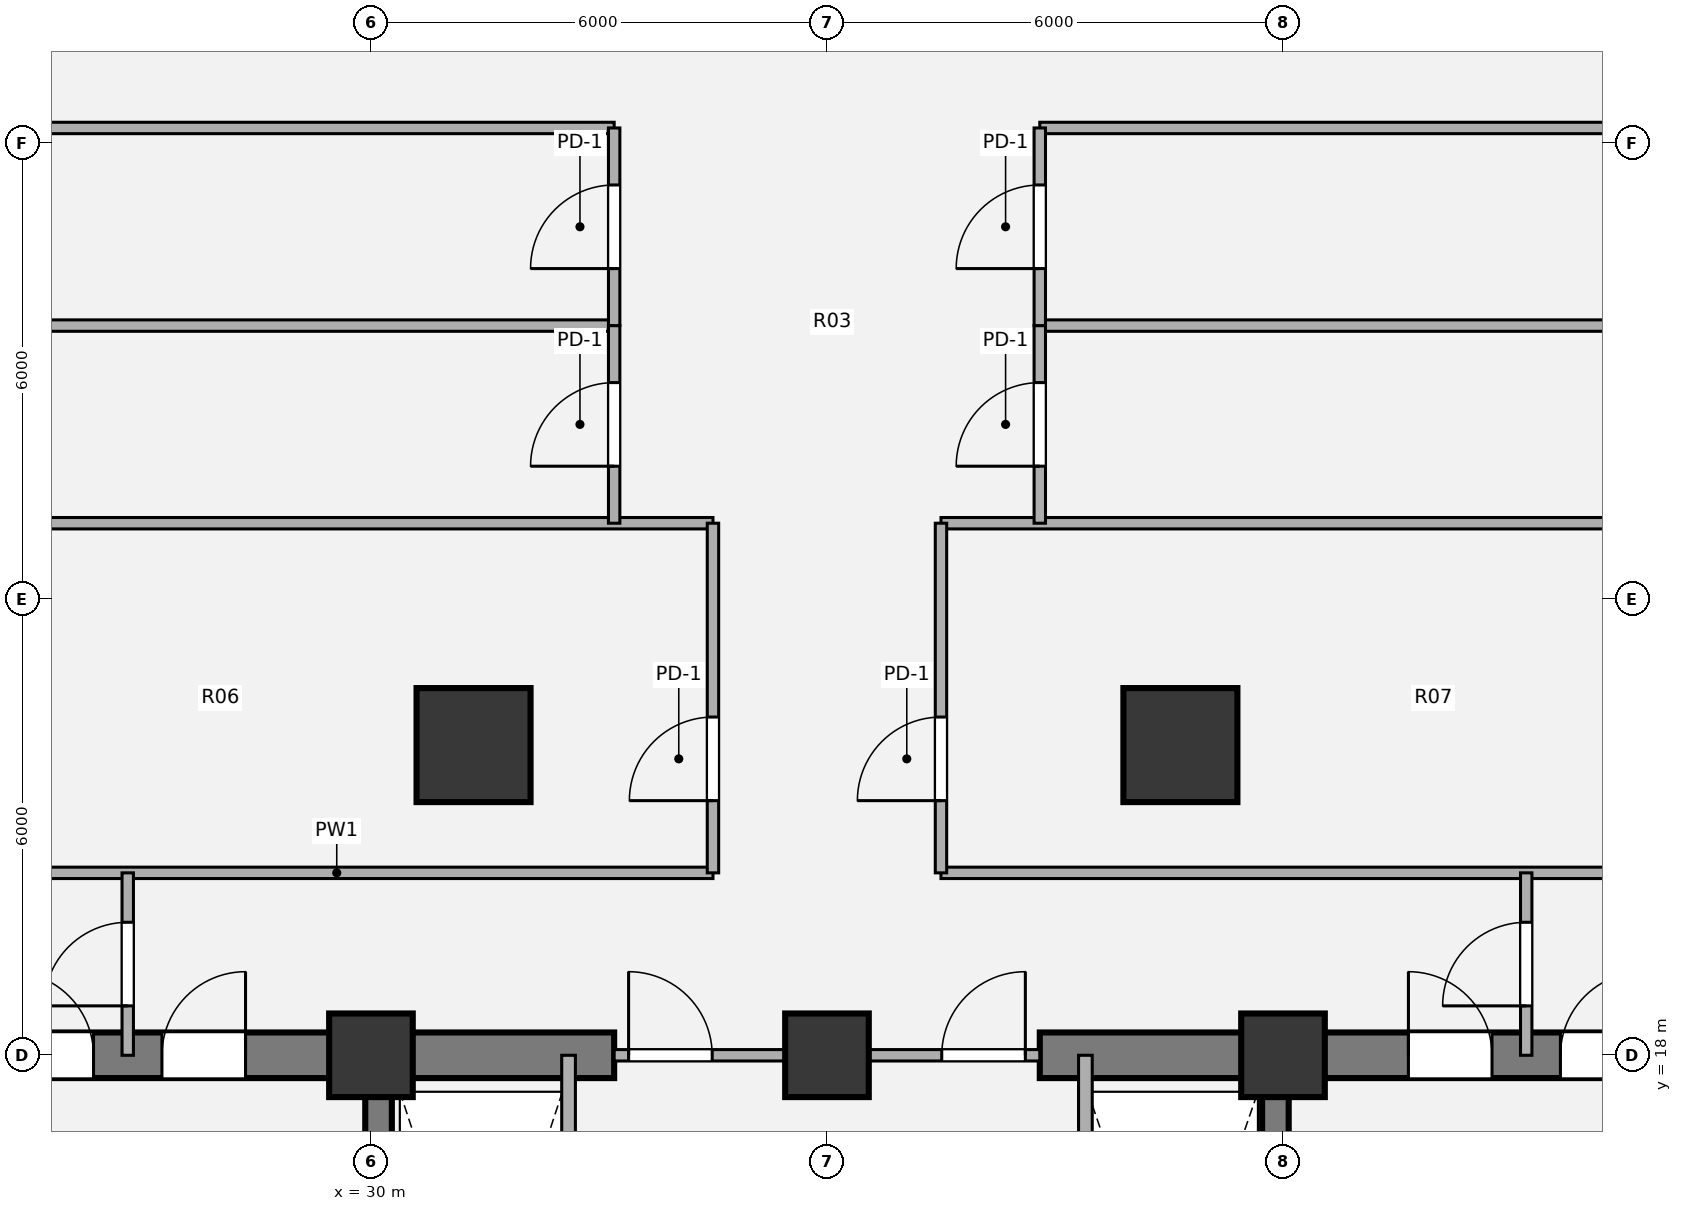
"""IFC4 building model, lengths in metres.
Left out: names, types, materials, properties, quantities, classifications, styles, units other than length and angle.
Written with IfcOpenShell. Run it as: python <this file> out.ifc"""

import sys

from ifc_helpers import new_model, si_unit, direction, frame, frame_2d, origin, origin_2d, place, context, subcontext, project, spatial, rectangle, hollow_circle, extrude, source, transform, mapped, element, fill, save


model = new_model("IFC4")
c1 = context("Model", 3, precision=1e-05, world=origin(), true_north=direction((0.0, 1.0)))
c2 = subcontext(c1, "Body", "Model", "MODEL_VIEW")
j1 = project(units=[si_unit("LENGTHUNIT", "METRE"), si_unit("PLANEANGLEUNIT", "RADIAN")], contexts=[c1])
p1 = place(None, origin())
s1 = spatial("IfcSite", under=j1, at=p1, CompositionType="ELEMENT")
p2 = place(p1, origin())
s2 = spatial("IfcBuilding", under=s1, at=p2, CompositionType="ELEMENT")
p3 = place(p2, frame((0.0, 0.0, 79.92)))
s3 = spatial("IfcBuildingStorey", under=s2, at=p3, CompositionType="ELEMENT", Elevation=79.92)
m1 = source(origin(), c2, "Body", "SweptSolid", [
    extrude(rectangle(XDim=1.1, YDim=1.1, at=origin_2d()), origin(), (0.0, 0.0, 1.0), 5.4),
])
for number, where, z_axis, x_axis in (
    (1, (30.0, 18.0, 0.0), (0.0, 0.0, 1.0), (1.0, 0.0, 0.0)),
    (2, (36.0, 18.0, 0.0), (0.0, 0.0, 1.0), (1.0, 0.0, 0.0)),
    (3, (42.0, 18.0, 0.0), (0.0, 0.0, 1.0), (1.0, 0.0, 0.0)),
):
    element("IfcColumn", number, at=place(p3, frame(where, z_axis=z_axis, x_axis=x_axis)), inside=s3, PredefinedType="COLUMN", context=c2, shape_type="MappedRepresentation", body=[
        mapped(m1, transform((0.0, 0.0, 0.0), x_axis=(1.0, 0.0, 0.0), y_axis=(0.0, 1.0, 0.0), z_axis=(0.0, 0.0, 1.0), scale=1.0)),
    ])
p4 = place(p3, frame((23.7, 18.0, 0.0), z_axis=(0.0, 0.0, 1.0), x_axis=(1.0, 0.0, 0.0)))
e4 = element("IfcWall", 4, at=p4, inside=s3, PredefinedType="SHEAR", context=c2, shape_type="SweptSolid", body=[
    extrude(rectangle(XDim=9.5, YDim=0.6, at=frame_2d((4.75, 0.0))), origin(), (0.0, 0.0, 1.0), 5.4),
])
p5 = place(p4, frame((1.55, 0.0, 0.0)))
e5 = element("IfcOpeningElement", 5, at=p5, cuts=e4, PredefinedType="OPENING", context=c2, shape_type="SweptSolid", body=[
    extrude(rectangle(XDim=1.1, YDim=2.1, at=origin_2d()), frame((0.55, 0.31, 1.05), z_axis=(0.0, -1.0, 0.0), x_axis=(1.0, 0.0, 0.0)), (0.0, 0.0, 1.0), 0.62),
])
p6 = place(p4, frame((3.55, 0.0, 0.0)))
e6 = element("IfcOpeningElement", 6, at=p6, cuts=e4, PredefinedType="OPENING", context=c2, shape_type="SweptSolid", body=[
    extrude(rectangle(XDim=1.1, YDim=2.1, at=origin_2d()), frame((0.55, 0.31, 1.05), z_axis=(0.0, -1.0, 0.0), x_axis=(1.0, 0.0, 0.0)), (0.0, 0.0, 1.0), 0.62),
])
p7 = place(p3, frame((38.8, 18.0, 0.0), z_axis=(0.0, 0.0, 1.0), x_axis=(1.0, 0.0, 0.0)))
e7 = element("IfcWall", 7, at=p7, inside=s3, PredefinedType="SHEAR", context=c2, shape_type="SweptSolid", body=[
    extrude(rectangle(XDim=9.5, YDim=0.6, at=frame_2d((4.75, 0.0))), origin(), (0.0, 0.0, 1.0), 5.4),
])
p8 = place(p7, frame((4.85, 0.0, 0.0)))
e8 = element("IfcOpeningElement", 8, at=p8, cuts=e7, PredefinedType="OPENING", context=c2, shape_type="SweptSolid", body=[
    extrude(rectangle(XDim=1.1, YDim=2.1, at=origin_2d()), frame((0.55, 0.31, 1.05), z_axis=(0.0, -1.0, 0.0), x_axis=(1.0, 0.0, 0.0)), (0.0, 0.0, 1.0), 0.62),
])
p9 = place(p7, frame((6.85, 0.0, 0.0)))
e9 = element("IfcOpeningElement", 9, at=p9, cuts=e7, PredefinedType="OPENING", context=c2, shape_type="SweptSolid", body=[
    extrude(rectangle(XDim=1.1, YDim=2.1, at=origin_2d()), frame((0.55, 0.31, 1.05), z_axis=(0.0, -1.0, 0.0), x_axis=(1.0, 0.0, 0.0)), (0.0, 0.0, 1.0), 0.62),
])
p10 = place(p3, frame((30.1, 6.0, 0.0), z_axis=(0.0, 0.0, 1.0), x_axis=(0.0, 1.0, 0.0)))
e10 = element("IfcWall", 10, at=p10, inside=s3, PredefinedType="SHEAR", context=c2, shape_type="SweptSolid", body=[
    extrude(rectangle(XDim=12.0, YDim=0.35, at=frame_2d((6.0, 0.0))), origin(), (0.0, 0.0, 1.0), 5.4),
])
p11 = place(p3, frame((41.9, 18.0, 0.0), z_axis=(0.0, 0.0, 1.0), x_axis=(0.0, -1.0, 0.0)))
e11 = element("IfcWall", 11, at=p11, inside=s3, PredefinedType="SHEAR", context=c2, shape_type="SweptSolid", body=[
    extrude(rectangle(XDim=12.0, YDim=0.35, at=frame_2d((6.0, 0.0))), origin(), (0.0, 0.0, 1.0), 5.4),
])
p12 = place(p11, frame((10.08, 0.0, 0.0)))
e12 = element("IfcOpeningElement", 12, at=p12, cuts=e11, PredefinedType="OPENING", context=c2, shape_type="SweptSolid", body=[
    extrude(rectangle(XDim=1.3, YDim=2.1, at=origin_2d()), frame((0.65, 0.185, 1.05), z_axis=(0.0, -1.0, 0.0), x_axis=(1.0, 0.0, 0.0)), (0.0, 0.0, 1.0), 0.37),
])
m2 = source(origin(), c2, "Body", "SweptSolid", [
    extrude(hollow_circle(Radius=0.75, WallThickness=0.05, at=origin_2d()), origin(), (0.0, 0.0, 1.0), 6.108),
])
for number, where, z_axis, x_axis in (
    (13, (31.35, 20.285, 0.46), (0.0, 0.588, 0.809), (-1.0, 0.0, 0.0)),
    (14, (40.65, 20.285, 0.46), (0.0, 0.588, 0.809), (-1.0, 0.0, 0.0)),
):
    element("IfcColumn", number, at=place(p3, frame(where, z_axis=z_axis, x_axis=x_axis)), inside=s3, PredefinedType="COLUMN", context=c2, shape_type="MappedRepresentation", body=[
        mapped(m2, transform((0.0, 0.0, 0.0), x_axis=(1.0, 0.0, 0.0), y_axis=(0.0, 1.0, 0.0), z_axis=(0.0, 0.0, 1.0), scale=1.0)),
    ])
p13 = place(p3, frame((39.4, 11.0, 0.0), z_axis=(0.0, 0.0, 1.0), x_axis=(0.0, 1.0, 0.0)))
e15 = element("IfcWall", 15, at=p13, inside=s3, PredefinedType="PARTITIONING", context=c2, shape_type="SweptSolid", body=[
    extrude(rectangle(XDim=7.0, YDim=0.18, at=frame_2d((3.5, 0.0))), origin(), (0.0, 0.0, 1.0), 5.05),
])
p14 = place(p3, frame((33.2, 18.0, 0.0), z_axis=(0.0, 0.0, 1.0), x_axis=(1.0, 0.0, 0.0)))
e16 = element("IfcWall", 16, at=p14, inside=s3, PredefinedType="PARTITIONING", context=c2, shape_type="SweptSolid", body=[
    extrude(rectangle(XDim=5.6, YDim=0.15, at=frame_2d((2.8, 0.0))), origin(), (0.0, 0.0, 1.0), 3.865),
])
p15 = place(p14, frame((0.19, 0.0, 0.0)))
e17 = element("IfcOpeningElement", 17, at=p15, cuts=e16, PredefinedType="OPENING", context=c2, shape_type="SweptSolid", body=[
    extrude(rectangle(XDim=1.1, YDim=2.1, at=origin_2d()), frame((0.55, 0.085, 1.05), z_axis=(0.0, -1.0, 0.0), x_axis=(1.0, 0.0, 0.0)), (0.0, 0.0, 1.0), 0.17),
])
p16 = place(p14, frame((4.31, 0.0, 0.0)))
e18 = element("IfcOpeningElement", 18, at=p16, cuts=e16, PredefinedType="OPENING", context=c2, shape_type="SweptSolid", body=[
    extrude(rectangle(XDim=1.1, YDim=2.1, at=origin_2d()), frame((0.55, 0.085, 1.05), z_axis=(0.0, -1.0, 0.0), x_axis=(1.0, 0.0, 0.0)), (0.0, 0.0, 1.0), 0.17),
])
p17 = place(p3, frame((32.6, 11.0, 0.0), z_axis=(0.0, 0.0, 1.0), x_axis=(0.0, 1.0, 0.0)))
e19 = element("IfcWall", 19, at=p17, inside=s3, PredefinedType="PARTITIONING", context=c2, shape_type="SweptSolid", body=[
    extrude(rectangle(XDim=7.0, YDim=0.18, at=frame_2d((3.5, 0.0))), origin(), (0.0, 0.0, 1.0), 5.05),
])
for number, where, z_axis, x_axis in (
    (20, (24.6, 20.4, 0.0), (0.0, 0.0, 1.0), (1.0, 0.0, 0.0)),
    (21, (37.5, 20.4, 0.0), (0.0, 0.0, 1.0), (1.0, 0.0, 0.0)),
):
    element("IfcWall", number, at=place(p3, frame(where, z_axis=z_axis, x_axis=x_axis)), inside=s3, PredefinedType="PARTITIONING", context=c2, shape_type="SweptSolid", body=[
        extrude(rectangle(XDim=9.9, YDim=0.15, at=frame_2d((4.95, 0.0))), origin(), (0.0, 0.0, 1.0), 5.05),
    ])
for number, where, z_axis, x_axis in (
    (22, (14.6, 25.0, 0.0), (0.0, 0.0, 1.0), (1.0, 0.0, 0.0)),
    (23, (37.5, 25.0, 0.0), (0.0, 0.0, 1.0), (1.0, 0.0, 0.0)),
):
    element("IfcWall", number, at=place(p3, frame(where, z_axis=z_axis, x_axis=x_axis)), inside=s3, PredefinedType="PARTITIONING", context=c2, shape_type="SweptSolid", body=[
        extrude(rectangle(XDim=19.9, YDim=0.15, at=frame_2d((9.95, 0.0))), origin(), (0.0, 0.0, 1.0), 4.532),
    ])
for number, where, z_axis, x_axis in (
    (24, (14.6, 27.6, 0.0), (0.0, 0.0, 1.0), (1.0, 0.0, 0.0)),
    (25, (38.8, 27.6, 0.0), (0.0, 0.0, 1.0), (1.0, 0.0, 0.0)),
    (26, (14.6, 30.2, 0.0), (0.0, 0.0, 1.0), (1.0, 0.0, 0.0)),
    (27, (38.8, 30.2, 0.0), (0.0, 0.0, 1.0), (1.0, 0.0, 0.0)),
):
    element("IfcWall", number, at=place(p3, frame(where, z_axis=z_axis, x_axis=x_axis)), inside=s3, PredefinedType="PARTITIONING", context=c2, shape_type="SweptSolid", body=[
        extrude(rectangle(XDim=18.6, YDim=0.15, at=frame_2d((9.3, 0.0))), origin(), (0.0, 0.0, 1.0), 4.532),
    ])
p18 = place(p3, frame((26.8, 18.0, 0.0), z_axis=(0.0, 0.0, 1.0), x_axis=(0.0, 1.0, 0.0)))
e28 = element("IfcWall", 28, at=p18, inside=s3, PredefinedType="PARTITIONING", context=c2, shape_type="SweptSolid", body=[
    extrude(rectangle(XDim=2.4, YDim=0.15, at=frame_2d((1.2, 0.0))), origin(), (0.0, 0.0, 1.0), 5.05),
])
p19 = place(p18, frame((0.65, 0.0, 0.0)))
e29 = element("IfcOpeningElement", 29, at=p19, cuts=e28, PredefinedType="OPENING", context=c2, shape_type="SweptSolid", body=[
    extrude(rectangle(XDim=1.1, YDim=2.1, at=origin_2d()), frame((0.55, 0.085, 1.05), z_axis=(0.0, -1.0, 0.0), x_axis=(1.0, 0.0, 0.0)), (0.0, 0.0, 1.0), 0.17),
])
p20 = place(p3, frame((33.2, 25.0, 0.0), z_axis=(0.0, 0.0, 1.0), x_axis=(0.0, 1.0, 0.0)))
e30 = element("IfcWall", 30, at=p20, inside=s3, PredefinedType="PARTITIONING", context=c2, shape_type="SweptSolid", body=[
    extrude(rectangle(XDim=2.6, YDim=0.15, at=frame_2d((1.3, 0.0))), origin(), (0.0, 0.0, 1.0), 5.05),
])
p21 = place(p20, frame((0.75, 0.0, 0.0)))
e31 = element("IfcOpeningElement", 31, at=p21, cuts=e30, PredefinedType="OPENING", context=c2, shape_type="SweptSolid", body=[
    extrude(rectangle(XDim=1.1, YDim=2.1, at=origin_2d()), frame((0.55, 0.085, 1.05), z_axis=(0.0, -1.0, 0.0), x_axis=(1.0, 0.0, 0.0)), (0.0, 0.0, 1.0), 0.17),
])
p22 = place(p3, frame((33.2, 27.6, 0.0), z_axis=(0.0, 0.0, 1.0), x_axis=(0.0, 1.0, 0.0)))
e32 = element("IfcWall", 32, at=p22, inside=s3, PredefinedType="PARTITIONING", context=c2, shape_type="SweptSolid", body=[
    extrude(rectangle(XDim=2.6, YDim=0.15, at=frame_2d((1.3, 0.0))), origin(), (0.0, 0.0, 1.0), 5.05),
])
p23 = place(p22, frame((0.75, 0.0, 0.0)))
e33 = element("IfcOpeningElement", 33, at=p23, cuts=e32, PredefinedType="OPENING", context=c2, shape_type="SweptSolid", body=[
    extrude(rectangle(XDim=1.1, YDim=2.1, at=origin_2d()), frame((0.55, 0.085, 1.05), z_axis=(0.0, -1.0, 0.0), x_axis=(1.0, 0.0, 0.0)), (0.0, 0.0, 1.0), 0.17),
])
p24 = place(p3, frame((34.5, 20.4, 0.0), z_axis=(0.0, 0.0, 1.0), x_axis=(0.0, 1.0, 0.0)))
e34 = element("IfcWall", 34, at=p24, inside=s3, PredefinedType="PARTITIONING", context=c2, shape_type="SweptSolid", body=[
    extrude(rectangle(XDim=4.6, YDim=0.15, at=frame_2d((2.3, 0.0))), origin(), (0.0, 0.0, 1.0), 5.05),
])
p25 = place(p24, frame((0.95, 0.0, 0.0)))
e35 = element("IfcOpeningElement", 35, at=p25, cuts=e34, PredefinedType="OPENING", context=c2, shape_type="SweptSolid", body=[
    extrude(rectangle(XDim=1.1, YDim=2.1, at=origin_2d()), frame((0.55, 0.085, 1.05), z_axis=(0.0, -1.0, 0.0), x_axis=(1.0, 0.0, 0.0)), (0.0, 0.0, 1.0), 0.17),
])
p26 = place(p3, frame((37.5, 20.4, 0.0), z_axis=(0.0, 0.0, 1.0), x_axis=(0.0, 1.0, 0.0)))
e36 = element("IfcWall", 36, at=p26, inside=s3, PredefinedType="PARTITIONING", context=c2, shape_type="SweptSolid", body=[
    extrude(rectangle(XDim=4.6, YDim=0.15, at=frame_2d((2.3, 0.0))), origin(), (0.0, 0.0, 1.0), 5.05),
])
p27 = place(p26, frame((0.95, 0.0, 0.0)))
e37 = element("IfcOpeningElement", 37, at=p27, cuts=e36, PredefinedType="OPENING", context=c2, shape_type="SweptSolid", body=[
    extrude(rectangle(XDim=1.1, YDim=2.1, at=origin_2d()), frame((0.55, 0.085, 1.05), z_axis=(0.0, -1.0, 0.0), x_axis=(1.0, 0.0, 0.0)), (0.0, 0.0, 1.0), 0.17),
])
p28 = place(p3, frame((38.8, 25.0, 0.0), z_axis=(0.0, 0.0, 1.0), x_axis=(0.0, 1.0, 0.0)))
e38 = element("IfcWall", 38, at=p28, inside=s3, PredefinedType="PARTITIONING", context=c2, shape_type="SweptSolid", body=[
    extrude(rectangle(XDim=2.6, YDim=0.15, at=frame_2d((1.3, 0.0))), origin(), (0.0, 0.0, 1.0), 5.05),
])
p29 = place(p28, frame((0.75, 0.0, 0.0)))
e39 = element("IfcOpeningElement", 39, at=p29, cuts=e38, PredefinedType="OPENING", context=c2, shape_type="SweptSolid", body=[
    extrude(rectangle(XDim=1.1, YDim=2.1, at=origin_2d()), frame((0.55, 0.085, 1.05), z_axis=(0.0, -1.0, 0.0), x_axis=(1.0, 0.0, 0.0)), (0.0, 0.0, 1.0), 0.17),
])
p30 = place(p3, frame((38.8, 27.6, 0.0), z_axis=(0.0, 0.0, 1.0), x_axis=(0.0, 1.0, 0.0)))
e40 = element("IfcWall", 40, at=p30, inside=s3, PredefinedType="PARTITIONING", context=c2, shape_type="SweptSolid", body=[
    extrude(rectangle(XDim=2.6, YDim=0.15, at=frame_2d((1.3, 0.0))), origin(), (0.0, 0.0, 1.0), 5.05),
])
p31 = place(p30, frame((0.75, 0.0, 0.0)))
e41 = element("IfcOpeningElement", 41, at=p31, cuts=e40, PredefinedType="OPENING", context=c2, shape_type="SweptSolid", body=[
    extrude(rectangle(XDim=1.1, YDim=2.1, at=origin_2d()), frame((0.55, 0.085, 1.05), z_axis=(0.0, -1.0, 0.0), x_axis=(1.0, 0.0, 0.0)), (0.0, 0.0, 1.0), 0.17),
])
p32 = place(p3, frame((45.2, 18.0, 0.0), z_axis=(0.0, 0.0, 1.0), x_axis=(0.0, 1.0, 0.0)))
e42 = element("IfcWall", 42, at=p32, inside=s3, PredefinedType="PARTITIONING", context=c2, shape_type="SweptSolid", body=[
    extrude(rectangle(XDim=2.4, YDim=0.15, at=frame_2d((1.2, 0.0))), origin(), (0.0, 0.0, 1.0), 5.05),
])
p33 = place(p32, frame((0.65, 0.0, 0.0)))
e43 = element("IfcOpeningElement", 43, at=p33, cuts=e42, PredefinedType="OPENING", context=c2, shape_type="SweptSolid", body=[
    extrude(rectangle(XDim=1.1, YDim=2.1, at=origin_2d()), frame((0.55, 0.085, 1.05), z_axis=(0.0, -1.0, 0.0), x_axis=(1.0, 0.0, 0.0)), (0.0, 0.0, 1.0), 0.17),
])
m3 = source(origin(), c2, "Body", "SweptSolid", [
    extrude(rectangle(XDim=1.1, YDim=2.1, at=origin_2d()), frame((0.55, 0.025, 1.05), z_axis=(0.0, -1.0, 0.0), x_axis=(1.0, 0.0, 0.0)), (0.0, 0.0, 1.0), 0.05),
])
p34 = place(p15, origin())
e44 = element("IfcDoor", 44, at=p34, inside=s3, OperationType="SINGLE_SWING_LEFT", PredefinedType="DOOR", context=c2, shape_type="MappedRepresentation", body=[
    mapped(m3, transform((0.0, 0.0, 0.0), x_axis=(1.0, 0.0, 0.0), y_axis=(0.0, 1.0, 0.0), z_axis=(0.0, 0.0, 1.0), scale=1.0)),
])
fill(e17, e44)
p35 = place(p16, origin())
e45 = element("IfcDoor", 45, at=p35, inside=s3, OperationType="SINGLE_SWING_RIGHT", PredefinedType="DOOR", context=c2, shape_type="MappedRepresentation", body=[
    mapped(m3, transform((0.0, 0.0, 0.0), x_axis=(1.0, 0.0, 0.0), y_axis=(0.0, 1.0, 0.0), z_axis=(0.0, 0.0, 1.0), scale=1.0)),
])
fill(e18, e45)
p36 = place(p5, origin())
e46 = element("IfcDoor", 46, at=p36, inside=s3, OperationType="SINGLE_SWING_LEFT", PredefinedType="DOOR", context=c2, shape_type="MappedRepresentation", body=[
    mapped(m3, transform((0.0, 0.0, 0.0), x_axis=(1.0, 0.0, 0.0), y_axis=(0.0, 1.0, 0.0), z_axis=(0.0, 0.0, 1.0), scale=1.0)),
])
fill(e5, e46)
p37 = place(p6, origin())
e47 = element("IfcDoor", 47, at=p37, inside=s3, OperationType="SINGLE_SWING_RIGHT", PredefinedType="DOOR", context=c2, shape_type="MappedRepresentation", body=[
    mapped(m3, transform((0.0, 0.0, 0.0), x_axis=(1.0, 0.0, 0.0), y_axis=(0.0, 1.0, 0.0), z_axis=(0.0, 0.0, 1.0), scale=1.0)),
])
fill(e6, e47)
p38 = place(p8, origin())
e48 = element("IfcDoor", 48, at=p38, inside=s3, OperationType="SINGLE_SWING_LEFT", PredefinedType="DOOR", context=c2, shape_type="MappedRepresentation", body=[
    mapped(m3, transform((0.0, 0.0, 0.0), x_axis=(1.0, 0.0, 0.0), y_axis=(0.0, 1.0, 0.0), z_axis=(0.0, 0.0, 1.0), scale=1.0)),
])
fill(e8, e48)
p39 = place(p9, origin())
e49 = element("IfcDoor", 49, at=p39, inside=s3, OperationType="SINGLE_SWING_RIGHT", PredefinedType="DOOR", context=c2, shape_type="MappedRepresentation", body=[
    mapped(m3, transform((0.0, 0.0, 0.0), x_axis=(1.0, 0.0, 0.0), y_axis=(0.0, 1.0, 0.0), z_axis=(0.0, 0.0, 1.0), scale=1.0)),
])
fill(e9, e49)
m4 = source(origin(), c2, "Body", "SweptSolid", [
    extrude(rectangle(XDim=1.1, YDim=2.1, at=origin_2d()), frame((0.55, 0.025, 1.05), z_axis=(0.0, -1.0, 0.0), x_axis=(1.0, 0.0, 0.0)), (0.0, 0.0, 1.0), 0.05),
])
p40 = place(p19, origin())
e50 = element("IfcDoor", 50, at=p40, inside=s3, OperationType="SINGLE_SWING_LEFT", PredefinedType="DOOR", context=c2, shape_type="MappedRepresentation", body=[
    mapped(m4, transform((0.0, 0.0, 0.0), x_axis=(1.0, 0.0, 0.0), y_axis=(0.0, 1.0, 0.0), z_axis=(0.0, 0.0, 1.0), scale=1.0)),
])
fill(e29, e50)
p41 = place(p21, origin())
e51 = element("IfcDoor", 51, at=p41, inside=s3, OperationType="SINGLE_SWING_LEFT", PredefinedType="DOOR", context=c2, shape_type="MappedRepresentation", body=[
    mapped(m4, transform((0.0, 0.0, 0.0), x_axis=(1.0, 0.0, 0.0), y_axis=(0.0, 1.0, 0.0), z_axis=(0.0, 0.0, 1.0), scale=1.0)),
])
fill(e31, e51)
p42 = place(p23, origin())
e52 = element("IfcDoor", 52, at=p42, inside=s3, OperationType="SINGLE_SWING_LEFT", PredefinedType="DOOR", context=c2, shape_type="MappedRepresentation", body=[
    mapped(m4, transform((0.0, 0.0, 0.0), x_axis=(1.0, 0.0, 0.0), y_axis=(0.0, 1.0, 0.0), z_axis=(0.0, 0.0, 1.0), scale=1.0)),
])
fill(e33, e52)
p43 = place(p25, origin())
e53 = element("IfcDoor", 53, at=p43, inside=s3, OperationType="SINGLE_SWING_LEFT", PredefinedType="DOOR", context=c2, shape_type="MappedRepresentation", body=[
    mapped(m4, transform((0.0, 0.0, 0.0), x_axis=(1.0, 0.0, 0.0), y_axis=(0.0, 1.0, 0.0), z_axis=(0.0, 0.0, 1.0), scale=1.0)),
])
fill(e35, e53)
p44 = place(p27, origin())
e54 = element("IfcDoor", 54, at=p44, inside=s3, OperationType="SINGLE_SWING_LEFT", PredefinedType="DOOR", context=c2, shape_type="MappedRepresentation", body=[
    mapped(m4, transform((0.0, 0.0, 0.0), x_axis=(1.0, 0.0, 0.0), y_axis=(0.0, 1.0, 0.0), z_axis=(0.0, 0.0, 1.0), scale=1.0)),
])
fill(e37, e54)
p45 = place(p29, origin())
e55 = element("IfcDoor", 55, at=p45, inside=s3, OperationType="SINGLE_SWING_LEFT", PredefinedType="DOOR", context=c2, shape_type="MappedRepresentation", body=[
    mapped(m4, transform((0.0, 0.0, 0.0), x_axis=(1.0, 0.0, 0.0), y_axis=(0.0, 1.0, 0.0), z_axis=(0.0, 0.0, 1.0), scale=1.0)),
])
fill(e39, e55)
p46 = place(p31, origin())
e56 = element("IfcDoor", 56, at=p46, inside=s3, OperationType="SINGLE_SWING_LEFT", PredefinedType="DOOR", context=c2, shape_type="MappedRepresentation", body=[
    mapped(m4, transform((0.0, 0.0, 0.0), x_axis=(1.0, 0.0, 0.0), y_axis=(0.0, 1.0, 0.0), z_axis=(0.0, 0.0, 1.0), scale=1.0)),
])
fill(e41, e56)
p47 = place(p33, origin())
e57 = element("IfcDoor", 57, at=p47, inside=s3, OperationType="SINGLE_SWING_LEFT", PredefinedType="DOOR", context=c2, shape_type="MappedRepresentation", body=[
    mapped(m4, transform((0.0, 0.0, 0.0), x_axis=(1.0, 0.0, 0.0), y_axis=(0.0, 1.0, 0.0), z_axis=(0.0, 0.0, 1.0), scale=1.0)),
])
fill(e43, e57)
save(model, sys.argv[1])
